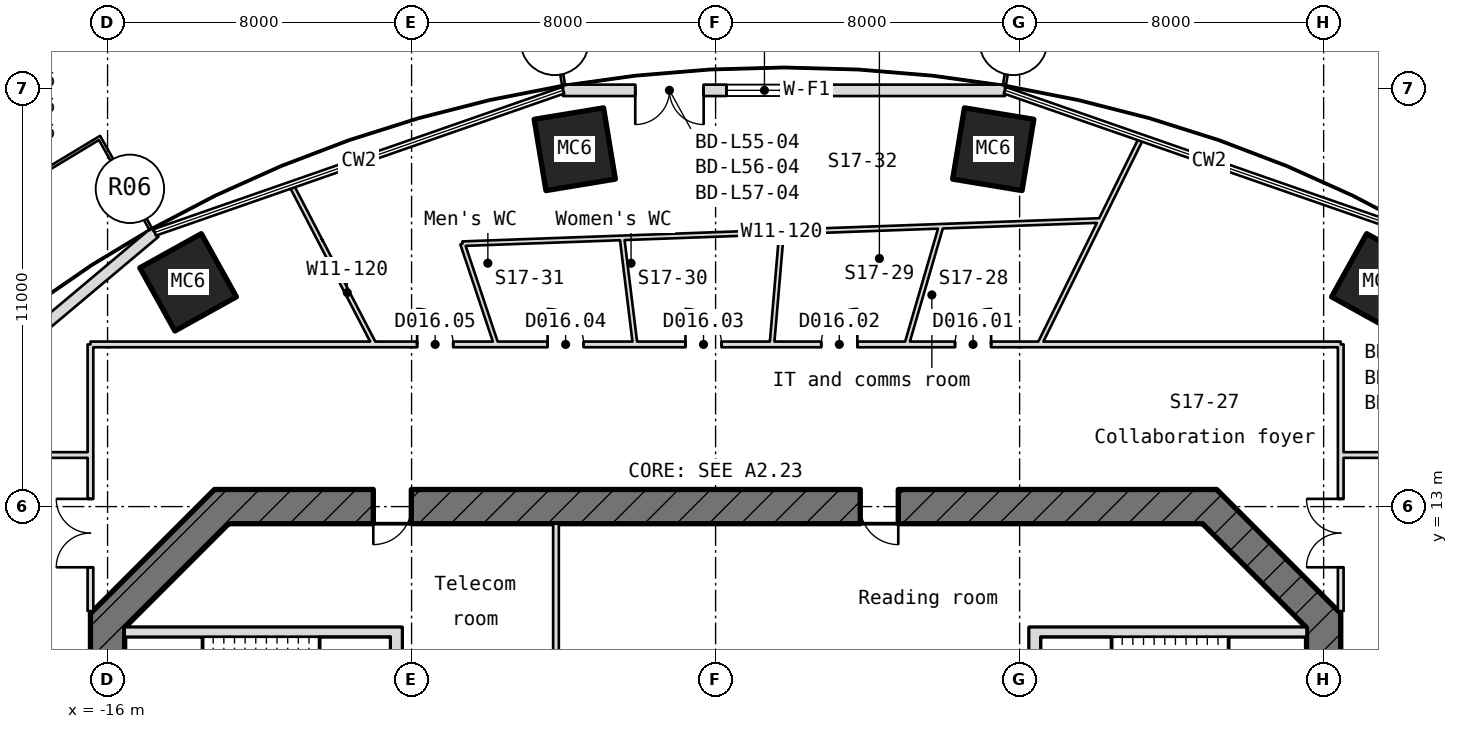
"""IFC4 building model, lengths in metres.
Left out: names, types, materials, properties, quantities, classifications, styles, units other than length and angle.
Written with IfcOpenShell. Run it as: python <this file> out.ifc"""

import sys

from ifc_helpers import new_model, si_unit, direction, frame, frame_2d, origin, origin_2d, place, context, subcontext, project, spatial, rectangle, hollow_rectangle, extrude, element, fill, save


model = new_model("IFC4")
c1 = context("Model", 3, precision=1e-05, world=origin(), true_north=direction((0.0, 1.0)))
c2 = subcontext(c1, "Body", "Model", "MODEL_VIEW")
j1 = project(units=[si_unit("LENGTHUNIT", "METRE"), si_unit("PLANEANGLEUNIT", "RADIAN")], contexts=[c1])
p1 = place(None, origin())
s1 = spatial("IfcSite", under=j1, at=p1, CompositionType="ELEMENT")
p2 = place(p1, origin())
s2 = spatial("IfcBuilding", under=s1, at=p2, CompositionType="ELEMENT")
p3 = place(p2, frame((0.0, 0.0, 248.2)))
s3 = spatial("IfcBuildingStorey", under=s2, at=p3, CompositionType="ELEMENT", Elevation=248.2)
for number, where, z_axis, x_axis in (
    (1, (17.48, 18.901, -0.18), (0.0, 0.0, 1.0), (0.874, -0.485, 0.0)),
    (2, (7.306, 22.403, -0.18), (0.0, 0.0, 1.0), (0.987, -0.163, 0.0)),
    (3, (-3.706, 22.403, -0.18), (0.0, 0.0, 1.0), (0.987, 0.163, 0.0)),
    (4, (-13.88, 18.901, -0.18), (0.0, 0.0, 1.0), (0.874, 0.485, 0.0)),
):
    element("IfcColumn", number, at=place(p3, frame(where, z_axis=z_axis, x_axis=x_axis)), inside=s3, PredefinedType="COLUMN", context=c2, shape_type="SweptSolid", body=[
        extrude(hollow_rectangle(XDim=1.85, YDim=1.9, WallThickness=0.065, at=origin_2d()), origin(), (0.0, 0.0, 1.0), 4.15),
    ])
p4 = place(p3, frame((7.614, 23.953, 0.0), z_axis=(0.0, 0.0, 1.0), x_axis=(-1.0, 0.0, 0.0)))
e5 = element("IfcWall", 5, at=p4, inside=s3, PredefinedType="SOLIDWALL", context=c2, shape_type="SweptSolid", body=[
    extrude(rectangle(XDim=11.629, YDim=0.3, at=frame_2d((5.814, 0.0))), origin(), (0.0, 0.0, 1.0), 3.97),
])
p5 = place(p4, frame((7.929, 0.0, 0.0)))
e6 = element("IfcOpeningElement", 6, at=p5, cuts=e5, PredefinedType="OPENING", context=c2, shape_type="SweptSolid", body=[
    extrude(rectangle(XDim=1.8, YDim=2.4, at=frame_2d((0.9, 1.2))), frame((0.0, 0.16, 0.0), z_axis=(0.0, -1.0, 0.0), x_axis=(1.0, 0.0, 0.0)), (0.0, 0.0, 1.0), 0.32),
])
p6 = place(p4, frame((5.329, 0.0, 0.9)))
e7 = element("IfcOpeningElement", 7, at=p6, cuts=e5, PredefinedType="OPENING", context=c2, shape_type="SweptSolid", body=[
    extrude(rectangle(XDim=2.0, YDim=1.5, at=frame_2d((1.0, 0.75))), frame((0.0, 0.16, 0.0), z_axis=(0.0, -1.0, 0.0), x_axis=(1.0, 0.0, 0.0)), (0.0, 0.0, 1.0), 0.32),
])
p7 = place(p3, frame((-14.758, 20.215, 0.0), z_axis=(0.0, 0.0, 1.0), x_axis=(-0.765697698686, -0.643200617403, 0.0)))
e8 = element("IfcWall", 8, at=p7, inside=s3, PredefinedType="SOLIDWALL", context=c2, shape_type="SweptSolid", body=[
    extrude(rectangle(XDim=10.739, YDim=0.3, at=frame_2d((5.369, 0.0))), origin(), (0.0, 0.0, 1.0), 3.97),
])
p8 = place(p7, frame((7.039, 0.0, 0.0)))
e9 = element("IfcOpeningElement", 9, at=p8, cuts=e8, PredefinedType="OPENING", context=c2, shape_type="SweptSolid", body=[
    extrude(rectangle(XDim=1.8, YDim=2.4, at=frame_2d((0.9, 1.2))), frame((0.0, 0.16, 0.0), z_axis=(0.0, -1.0, 0.0), x_axis=(1.0, 0.0, 0.0)), (0.0, 0.0, 1.0), 0.32),
])
p9 = place(p7, frame((4.438, 0.0, 0.9)))
e10 = element("IfcOpeningElement", 10, at=p9, cuts=e8, PredefinedType="OPENING", context=c2, shape_type="SweptSolid", body=[
    extrude(rectangle(XDim=2.0, YDim=1.5, at=frame_2d((1.0, 0.75))), frame((0.0, 0.16, 0.0), z_axis=(0.0, -1.0, 0.0), x_axis=(1.0, 0.0, 0.0)), (0.0, 0.0, 1.0), 0.32),
])
p10 = place(p3, frame((16.0, -10.186, -0.18), z_axis=(0.0, 0.0, 1.0), x_axis=(0.0, 1.0, 0.0)))
e11 = element("IfcWall", 11, at=p10, inside=s3, PredefinedType="SHEAR", context=c2, shape_type="SweptSolid", body=[
    extrude(rectangle(XDim=20.373, YDim=0.9, at=frame_2d((10.186, 0.0))), origin(), (0.0, 0.0, 1.0), 4.15),
])
p11 = place(p10, frame((8.986, 0.0, 0.18)))
e12 = element("IfcOpeningElement", 12, at=p11, cuts=e11, PredefinedType="OPENING", context=c2, shape_type="SweptSolid", body=[
    extrude(rectangle(XDim=2.4, YDim=2.1, at=frame_2d((1.2, 1.05))), frame((0.0, 0.46, 0.0), z_axis=(0.0, -1.0, 0.0), x_axis=(1.0, 0.0, 0.0)), (0.0, 0.0, 1.0), 0.92),
])
p12 = place(p10, frame((13.586, 0.0, 0.18)))
e13 = element("IfcOpeningElement", 13, at=p12, cuts=e11, PredefinedType="OPENING", context=c2, shape_type="SweptSolid", body=[
    extrude(rectangle(XDim=1.2, YDim=2.1, at=frame_2d((0.6, 1.05))), frame((0.0, 0.46, 0.0), z_axis=(0.0, -1.0, 0.0), x_axis=(1.0, 0.0, 0.0)), (0.0, 0.0, 1.0), 0.92),
])
p13 = place(p3, frame((16.132, 9.868, -0.18), z_axis=(0.0, 0.0, 1.0), x_axis=(-0.707106781187, 0.707106781187, 0.0)))
e14 = element("IfcWall", 14, at=p13, inside=s3, PredefinedType="SHEAR", context=c2, shape_type="SweptSolid", body=[
    extrude(rectangle(XDim=4.615, YDim=0.9, at=frame_2d((2.308, 0.0))), origin(), (0.0, 0.0, 1.0), 4.15),
])
p14 = place(p3, frame((13.186, 13.0, -0.18), z_axis=(0.0, 0.0, 1.0), x_axis=(-1.0, 0.0, 0.0)))
e15 = element("IfcWall", 15, at=p14, inside=s3, PredefinedType="SHEAR", context=c2, shape_type="SweptSolid", body=[
    extrude(rectangle(XDim=26.373, YDim=0.9, at=frame_2d((13.186, 0.0))), origin(), (0.0, 0.0, 1.0), 4.15),
])
p15 = place(p14, frame((21.193, 0.0, 0.18)))
e16 = element("IfcOpeningElement", 16, at=p15, cuts=e15, PredefinedType="OPENING", context=c2, shape_type="SweptSolid", body=[
    extrude(rectangle(XDim=1.0, YDim=2.1, at=frame_2d((0.5, 1.05))), frame((0.0, 0.46, 0.0), z_axis=(0.0, -1.0, 0.0), x_axis=(1.0, 0.0, 0.0)), (0.0, 0.0, 1.0), 0.92),
])
p16 = place(p14, frame((8.379, 0.0, 0.18)))
e17 = element("IfcOpeningElement", 17, at=p16, cuts=e15, PredefinedType="OPENING", context=c2, shape_type="SweptSolid", body=[
    extrude(rectangle(XDim=1.0, YDim=2.1, at=frame_2d((0.5, 1.05))), frame((0.0, 0.46, 0.0), z_axis=(0.0, -1.0, 0.0), x_axis=(1.0, 0.0, 0.0)), (0.0, 0.0, 1.0), 0.92),
])
p17 = place(p3, frame((-12.868, 13.132, -0.18), z_axis=(0.0, 0.0, 1.0), x_axis=(-0.707106781187, -0.707106781187, 0.0)))
e18 = element("IfcWall", 18, at=p17, inside=s3, PredefinedType="SHEAR", context=c2, shape_type="SweptSolid", body=[
    extrude(rectangle(XDim=4.615, YDim=0.9, at=frame_2d((2.308, 0.0))), origin(), (0.0, 0.0, 1.0), 4.15),
])
p18 = place(p3, frame((-16.0, 10.186, -0.18), z_axis=(0.0, 0.0, 1.0), x_axis=(0.0, -1.0, 0.0)))
e19 = element("IfcWall", 19, at=p18, inside=s3, PredefinedType="SHEAR", context=c2, shape_type="SweptSolid", body=[
    extrude(rectangle(XDim=20.373, YDim=0.9, at=frame_2d((10.186, 0.0))), origin(), (0.0, 0.0, 1.0), 4.15),
])
p19 = place(p18, frame((8.986, 0.0, 0.18)))
e20 = element("IfcOpeningElement", 20, at=p19, cuts=e19, PredefinedType="OPENING", context=c2, shape_type="SweptSolid", body=[
    extrude(rectangle(XDim=2.4, YDim=2.1, at=frame_2d((1.2, 1.05))), frame((0.0, 0.46, 0.0), z_axis=(0.0, -1.0, 0.0), x_axis=(1.0, 0.0, 0.0)), (0.0, 0.0, 1.0), 0.92),
])
p20 = place(p18, frame((5.586, 0.0, 0.18)))
e21 = element("IfcOpeningElement", 21, at=p20, cuts=e19, PredefinedType="OPENING", context=c2, shape_type="SweptSolid", body=[
    extrude(rectangle(XDim=1.2, YDim=2.1, at=frame_2d((0.6, 1.05))), frame((0.0, 0.46, 0.0), z_axis=(0.0, -1.0, 0.0), x_axis=(1.0, 0.0, 0.0)), (0.0, 0.0, 1.0), 0.92),
])
for number, where, z_axis, x_axis in (
    (22, (-15.55, 9.7, -0.18), (0.0, 0.0, 1.0), (1.0, 0.0, 0.0)),
    (23, (8.55, 9.7, -0.18), (0.0, 0.0, 1.0), (1.0, 0.0, 0.0)),
):
    element("IfcWall", number, at=place(p3, frame(where, z_axis=z_axis, x_axis=x_axis)), inside=s3, PredefinedType="SHEAR", context=c2, shape_type="SweptSolid", body=[
        extrude(rectangle(XDim=7.0, YDim=0.25, at=frame_2d((3.5, 0.0))), origin(), (0.0, 0.0, 1.0), 4.15),
    ])
p21 = place(p3, frame((-8.4, 8.35, -0.18), z_axis=(0.0, 0.0, 1.0), x_axis=(0.0, 1.0, 0.0)))
e24 = element("IfcWall", 24, at=p21, inside=s3, PredefinedType="SHEAR", context=c2, shape_type="SweptSolid", body=[
    extrude(rectangle(XDim=1.475, YDim=0.3, at=frame_2d((0.737, 0.0))), origin(), (0.0, 0.0, 1.0), 4.15),
])
p22 = place(p3, frame((-4.2, 8.46, 0.0), z_axis=(0.0, 0.0, 1.0), x_axis=(0.0, 1.0, 0.0)))
e25 = element("IfcWall", 25, at=p22, inside=s3, PredefinedType="PARTITIONING", context=c2, shape_type="SweptSolid", body=[
    extrude(rectangle(XDim=4.09, YDim=0.15, at=frame_2d((2.045, 0.0))), origin(), (0.0, 0.0, 1.0), 3.97),
])
p23 = place(p3, frame((8.4, 8.35, -0.18), z_axis=(0.0, 0.0, 1.0), x_axis=(0.0, 1.0, 0.0)))
e26 = element("IfcWall", 26, at=p23, inside=s3, PredefinedType="SHEAR", context=c2, shape_type="SweptSolid", body=[
    extrude(rectangle(XDim=1.475, YDim=0.3, at=frame_2d((0.737, 0.0))), origin(), (0.0, 0.0, 1.0), 4.15),
])
p24 = place(p3, frame((-18.85, 14.357, 0.0), z_axis=(0.0, 0.0, 1.0), x_axis=(1.0, 0.0, 0.0)))
e27 = element("IfcWall", 27, at=p24, inside=s3, PredefinedType="PARTITIONING", context=c2, shape_type="SweptSolid", body=[
    extrude(rectangle(XDim=2.4, YDim=0.15, at=frame_2d((1.2, 0.0))), origin(), (0.0, 0.0, 1.0), 3.97),
])
p25 = place(p3, frame((-16.45, 10.25, 0.0), z_axis=(0.0, 0.0, 1.0), x_axis=(0.0, 1.0, 0.0)))
e28 = element("IfcWall", 28, at=p25, inside=s3, PredefinedType="PARTITIONING", context=c2, shape_type="SweptSolid", body=[
    extrude(rectangle(XDim=7.017, YDim=0.15, at=frame_2d((3.509, 0.0))), origin(), (0.0, 0.0, 1.0), 3.97),
])
p26 = place(p25, frame((1.153, 0.0, 0.0)))
e29 = element("IfcOpeningElement", 29, at=p26, cuts=e28, PredefinedType="OPENING", context=c2, shape_type="SweptSolid", body=[
    extrude(rectangle(XDim=1.8, YDim=2.1, at=frame_2d((0.9, 1.05))), frame((0.0, 0.085, 0.0), z_axis=(0.0, -1.0, 0.0), x_axis=(1.0, 0.0, 0.0)), (0.0, 0.0, 1.0), 0.17),
])
p27 = place(p3, frame((-16.45, 17.267, 0.0), z_axis=(0.0, 0.0, 1.0), x_axis=(1.0, 0.0, 0.0)))
e30 = element("IfcWall", 30, at=p27, inside=s3, PredefinedType="PARTITIONING", context=c2, shape_type="SweptSolid", body=[
    extrude(rectangle(XDim=32.9, YDim=0.15, at=frame_2d((16.45, 0.0))), origin(), (0.0, 0.0, 1.0), 3.97),
])
p28 = place(p27, frame((22.75, 0.0, 0.0)))
e31 = element("IfcOpeningElement", 31, at=p28, cuts=e30, PredefinedType="OPENING", context=c2, shape_type="SweptSolid", body=[
    extrude(rectangle(XDim=0.95, YDim=2.1, at=frame_2d((0.475, 1.05))), frame((0.0, 0.085, 0.0), z_axis=(0.0, -1.0, 0.0), x_axis=(1.0, 0.0, 0.0)), (0.0, 0.0, 1.0), 0.17),
])
p29 = place(p27, frame((19.23, 0.0, 0.0)))
e32 = element("IfcOpeningElement", 32, at=p29, cuts=e30, PredefinedType="OPENING", context=c2, shape_type="SweptSolid", body=[
    extrude(rectangle(XDim=0.95, YDim=2.1, at=frame_2d((0.475, 1.05))), frame((0.0, 0.085, 0.0), z_axis=(0.0, -1.0, 0.0), x_axis=(1.0, 0.0, 0.0)), (0.0, 0.0, 1.0), 0.17),
])
p30 = place(p27, frame((15.657, 0.0, 0.0)))
e33 = element("IfcOpeningElement", 33, at=p30, cuts=e30, PredefinedType="OPENING", context=c2, shape_type="SweptSolid", body=[
    extrude(rectangle(XDim=0.95, YDim=2.1, at=frame_2d((0.475, 1.05))), frame((0.0, 0.085, 0.0), z_axis=(0.0, -1.0, 0.0), x_axis=(1.0, 0.0, 0.0)), (0.0, 0.0, 1.0), 0.17),
])
p31 = place(p27, frame((12.029, 0.0, 0.0)))
e34 = element("IfcOpeningElement", 34, at=p31, cuts=e30, PredefinedType="OPENING", context=c2, shape_type="SweptSolid", body=[
    extrude(rectangle(XDim=0.95, YDim=2.1, at=frame_2d((0.475, 1.05))), frame((0.0, 0.085, 0.0), z_axis=(0.0, -1.0, 0.0), x_axis=(1.0, 0.0, 0.0)), (0.0, 0.0, 1.0), 0.17),
])
p32 = place(p27, frame((8.596, 0.0, 0.0)))
e35 = element("IfcOpeningElement", 35, at=p32, cuts=e30, PredefinedType="OPENING", context=c2, shape_type="SweptSolid", body=[
    extrude(rectangle(XDim=0.95, YDim=2.1, at=frame_2d((0.475, 1.05))), frame((0.0, 0.085, 0.0), z_axis=(0.0, -1.0, 0.0), x_axis=(1.0, 0.0, 0.0)), (0.0, 0.0, 1.0), 0.17),
])
p33 = place(p3, frame((-8.984, 17.267, 0.0), z_axis=(0.0, 0.0, 1.0), x_axis=(-0.461490331018, 0.887145238604, 0.0)))
e36 = element("IfcWall", 36, at=p33, inside=s3, PredefinedType="PARTITIONING", context=c2, shape_type="SweptSolid", body=[
    extrude(rectangle(XDim=3.073, YDim=0.12, at=frame_2d((1.536, 0.0))), origin(), (0.0, 0.0, 1.0), 3.617),
])
p34 = place(p3, frame((-10.402, 19.993, 0.0), z_axis=(0.0, 0.0, 1.0), x_axis=(-0.461524233579, 0.887127601769, 0.0)))
e37 = element("IfcWall", 37, at=p34, inside=s3, PredefinedType="PARTITIONING", context=c2, shape_type="SweptSolid", body=[
    extrude(rectangle(XDim=1.658, YDim=0.12, at=frame_2d((0.829, 0.0))), origin(), (0.0, 0.0, 1.0), 3.97),
])
p35 = place(p3, frame((-6.66, 19.918, 0.0), z_axis=(0.0, 0.0, 1.0), x_axis=(0.317118703872, -0.948385853783, 0.0)))
e38 = element("IfcWall", 38, at=p35, inside=s3, PredefinedType="PARTITIONING", context=c2, shape_type="SweptSolid", body=[
    extrude(rectangle(XDim=2.795, YDim=0.12, at=frame_2d((1.397, 0.0))), origin(), (0.0, 0.0, 1.0), 3.553),
])
p36 = place(p3, frame((-2.462, 20.071, 0.0), z_axis=(0.0, 0.0, 1.0), x_axis=(0.121704558914, -0.992566370748, 0.0)))
e39 = element("IfcWall", 39, at=p36, inside=s3, PredefinedType="PARTITIONING", context=c2, shape_type="SweptSolid", body=[
    extrude(rectangle(XDim=2.824, YDim=0.12, at=frame_2d((1.412, 0.0))), origin(), (0.0, 0.0, 1.0), 3.97),
])
p37 = place(p3, frame((1.736, 20.223, 0.0), z_axis=(0.0, 0.0, 1.0), x_axis=(-0.08549683198, -0.996338442359, 0.0)))
e40 = element("IfcWall", 40, at=p37, inside=s3, PredefinedType="PARTITIONING", context=c2, shape_type="SweptSolid", body=[
    extrude(rectangle(XDim=2.967, YDim=0.12, at=frame_2d((1.483, 0.0))), origin(), (0.0, 0.0, 1.0), 3.97),
])
p38 = place(p3, frame((5.934, 20.376, 0.0), z_axis=(0.0, 0.0, 1.0), x_axis=(-0.279577259278, -0.960123198394, 0.0)))
e41 = element("IfcWall", 41, at=p38, inside=s3, PredefinedType="PARTITIONING", context=c2, shape_type="SweptSolid", body=[
    extrude(rectangle(XDim=3.238, YDim=0.12, at=frame_2d((1.619, 0.0))), origin(), (0.0, 0.0, 1.0), 3.97),
])
p39 = place(p3, frame((8.522, 17.267, 0.0), z_axis=(0.0, 0.0, 1.0), x_axis=(0.442552062216, 0.896742812755, 0.0)))
e42 = element("IfcWall", 42, at=p39, inside=s3, PredefinedType="PARTITIONING", context=c2, shape_type="SweptSolid", body=[
    extrude(rectangle(XDim=6.062, YDim=0.12, at=frame_2d((3.031, 0.0))), origin(), (0.0, 0.0, 1.0), 3.97),
])
p40 = place(p3, frame((10.132, 20.529, 0.0), z_axis=(0.0, 0.0, 1.0), x_axis=(-0.999337395221, -0.036397397061, 0.0)))
e43 = element("IfcWall", 43, at=p40, inside=s3, PredefinedType="PARTITIONING", context=c2, shape_type="SweptSolid", body=[
    extrude(rectangle(XDim=16.803, YDim=0.12, at=frame_2d((8.401, 0.0))), origin(), (0.0, 0.0, 1.0), 3.97),
])
p41 = place(p3, frame((16.45, 10.25, 0.0), z_axis=(0.0, 0.0, 1.0), x_axis=(0.0, 1.0, 0.0)))
e44 = element("IfcWall", 44, at=p41, inside=s3, PredefinedType="PARTITIONING", context=c2, shape_type="SweptSolid", body=[
    extrude(rectangle(XDim=7.017, YDim=0.15, at=frame_2d((3.509, 0.0))), origin(), (0.0, 0.0, 1.0), 3.97),
])
p42 = place(p41, frame((1.153, 0.0, 0.0)))
e45 = element("IfcOpeningElement", 45, at=p42, cuts=e44, PredefinedType="OPENING", context=c2, shape_type="SweptSolid", body=[
    extrude(rectangle(XDim=1.8, YDim=2.1, at=frame_2d((0.9, 1.05))), frame((0.0, 0.085, 0.0), z_axis=(0.0, -1.0, 0.0), x_axis=(1.0, 0.0, 0.0)), (0.0, 0.0, 1.0), 0.17),
])
p43 = place(p3, frame((16.45, 14.357, 0.0), z_axis=(0.0, 0.0, 1.0), x_axis=(1.0, 0.0, 0.0)))
e46 = element("IfcWall", 46, at=p43, inside=s3, PredefinedType="PARTITIONING", context=c2, shape_type="SweptSolid", body=[
    extrude(rectangle(XDim=2.4, YDim=0.15, at=frame_2d((1.2, 0.0))), origin(), (0.0, 0.0, 1.0), 3.97),
])
p44 = place(p5, origin())
e47 = element("IfcDoor", 47, at=p44, inside=s3, OperationType="SINGLE_SWING_LEFT", PredefinedType="DOOR", context=c2, shape_type="SweptSolid", body=[
    extrude(rectangle(XDim=1.8, YDim=2.4, at=frame_2d((0.9, 1.2))), frame((0.0, 0.025, 0.0), z_axis=(0.0, -1.0, 0.0), x_axis=(1.0, 0.0, 0.0)), (0.0, 0.0, 1.0), 0.05),
])
fill(e6, e47)
p45 = place(p6, origin())
e48 = element("IfcWindow", 48, at=p45, inside=s3, PartitioningType="SINGLE_PANEL", PredefinedType="WINDOW", context=c2, shape_type="SweptSolid", body=[
    extrude(rectangle(XDim=2.0, YDim=1.5, at=frame_2d((1.0, 0.75))), frame((0.0, 0.03, 0.0), z_axis=(0.0, -1.0, 0.0), x_axis=(1.0, 0.0, 0.0)), (0.0, 0.0, 1.0), 0.06),
])
fill(e7, e48)
p46 = place(p15, origin())
e49 = element("IfcDoor", 49, at=p46, inside=s3, OperationType="SINGLE_SWING_RIGHT", PredefinedType="DOOR", context=c2, shape_type="SweptSolid", body=[
    extrude(rectangle(XDim=1.0, YDim=2.1, at=frame_2d((0.5, 1.05))), frame((0.0, 0.025, 0.0), z_axis=(0.0, -1.0, 0.0), x_axis=(1.0, 0.0, 0.0)), (0.0, 0.0, 1.0), 0.05),
])
fill(e16, e49)
p47 = place(p16, origin())
e50 = element("IfcDoor", 50, at=p47, inside=s3, OperationType="SINGLE_SWING_RIGHT", PredefinedType="DOOR", context=c2, shape_type="SweptSolid", body=[
    extrude(rectangle(XDim=1.0, YDim=2.1, at=frame_2d((0.5, 1.05))), frame((0.0, 0.025, 0.0), z_axis=(0.0, -1.0, 0.0), x_axis=(1.0, 0.0, 0.0)), (0.0, 0.0, 1.0), 0.05),
])
fill(e17, e50)
p48 = place(p28, origin())
e51 = element("IfcDoor", 51, at=p48, inside=s3, OperationType="SINGLE_SWING_RIGHT", PredefinedType="DOOR", context=c2, shape_type="SweptSolid", body=[
    extrude(rectangle(XDim=0.95, YDim=2.1, at=frame_2d((0.475, 1.05))), frame((0.0, 0.025, 0.0), z_axis=(0.0, -1.0, 0.0), x_axis=(1.0, 0.0, 0.0)), (0.0, 0.0, 1.0), 0.05),
])
fill(e31, e51)
p49 = place(p29, origin())
e52 = element("IfcDoor", 52, at=p49, inside=s3, OperationType="SINGLE_SWING_RIGHT", PredefinedType="DOOR", context=c2, shape_type="SweptSolid", body=[
    extrude(rectangle(XDim=0.95, YDim=2.1, at=frame_2d((0.475, 1.05))), frame((0.0, 0.025, 0.0), z_axis=(0.0, -1.0, 0.0), x_axis=(1.0, 0.0, 0.0)), (0.0, 0.0, 1.0), 0.05),
])
fill(e32, e52)
p50 = place(p30, origin())
e53 = element("IfcDoor", 53, at=p50, inside=s3, OperationType="SINGLE_SWING_RIGHT", PredefinedType="DOOR", context=c2, shape_type="SweptSolid", body=[
    extrude(rectangle(XDim=0.95, YDim=2.1, at=frame_2d((0.475, 1.05))), frame((0.0, 0.025, 0.0), z_axis=(0.0, -1.0, 0.0), x_axis=(1.0, 0.0, 0.0)), (0.0, 0.0, 1.0), 0.05),
])
fill(e33, e53)
p51 = place(p31, origin())
e54 = element("IfcDoor", 54, at=p51, inside=s3, OperationType="SINGLE_SWING_RIGHT", PredefinedType="DOOR", context=c2, shape_type="SweptSolid", body=[
    extrude(rectangle(XDim=0.95, YDim=2.1, at=frame_2d((0.475, 1.05))), frame((0.0, 0.025, 0.0), z_axis=(0.0, -1.0, 0.0), x_axis=(1.0, 0.0, 0.0)), (0.0, 0.0, 1.0), 0.05),
])
fill(e34, e54)
p52 = place(p32, origin())
e55 = element("IfcDoor", 55, at=p52, inside=s3, OperationType="SINGLE_SWING_RIGHT", PredefinedType="DOOR", context=c2, shape_type="SweptSolid", body=[
    extrude(rectangle(XDim=0.95, YDim=2.1, at=frame_2d((0.475, 1.05))), frame((0.0, 0.025, 0.0), z_axis=(0.0, -1.0, 0.0), x_axis=(1.0, 0.0, 0.0)), (0.0, 0.0, 1.0), 0.05),
])
fill(e35, e55)
p53 = place(p26, origin())
e56 = element("IfcDoor", 56, at=p53, inside=s3, OperationType="DOUBLE_DOOR_SINGLE_SWING", PredefinedType="DOOR", context=c2, shape_type="SweptSolid", body=[
    extrude(rectangle(XDim=1.8, YDim=2.1, at=frame_2d((0.9, 1.05))), frame((0.0, 0.025, 0.0), z_axis=(0.0, -1.0, 0.0), x_axis=(1.0, 0.0, 0.0)), (0.0, 0.0, 1.0), 0.05),
])
fill(e29, e56)
p54 = place(p42, origin())
e57 = element("IfcDoor", 57, at=p54, inside=s3, OperationType="DOUBLE_DOOR_SINGLE_SWING", PredefinedType="DOOR", context=c2, shape_type="SweptSolid", body=[
    extrude(rectangle(XDim=1.8, YDim=2.1, at=frame_2d((0.9, 1.05))), frame((0.0, 0.025, 0.0), z_axis=(0.0, -1.0, 0.0), x_axis=(1.0, 0.0, 0.0)), (0.0, 0.0, 1.0), 0.05),
])
fill(e45, e57)
save(model, sys.argv[1])
